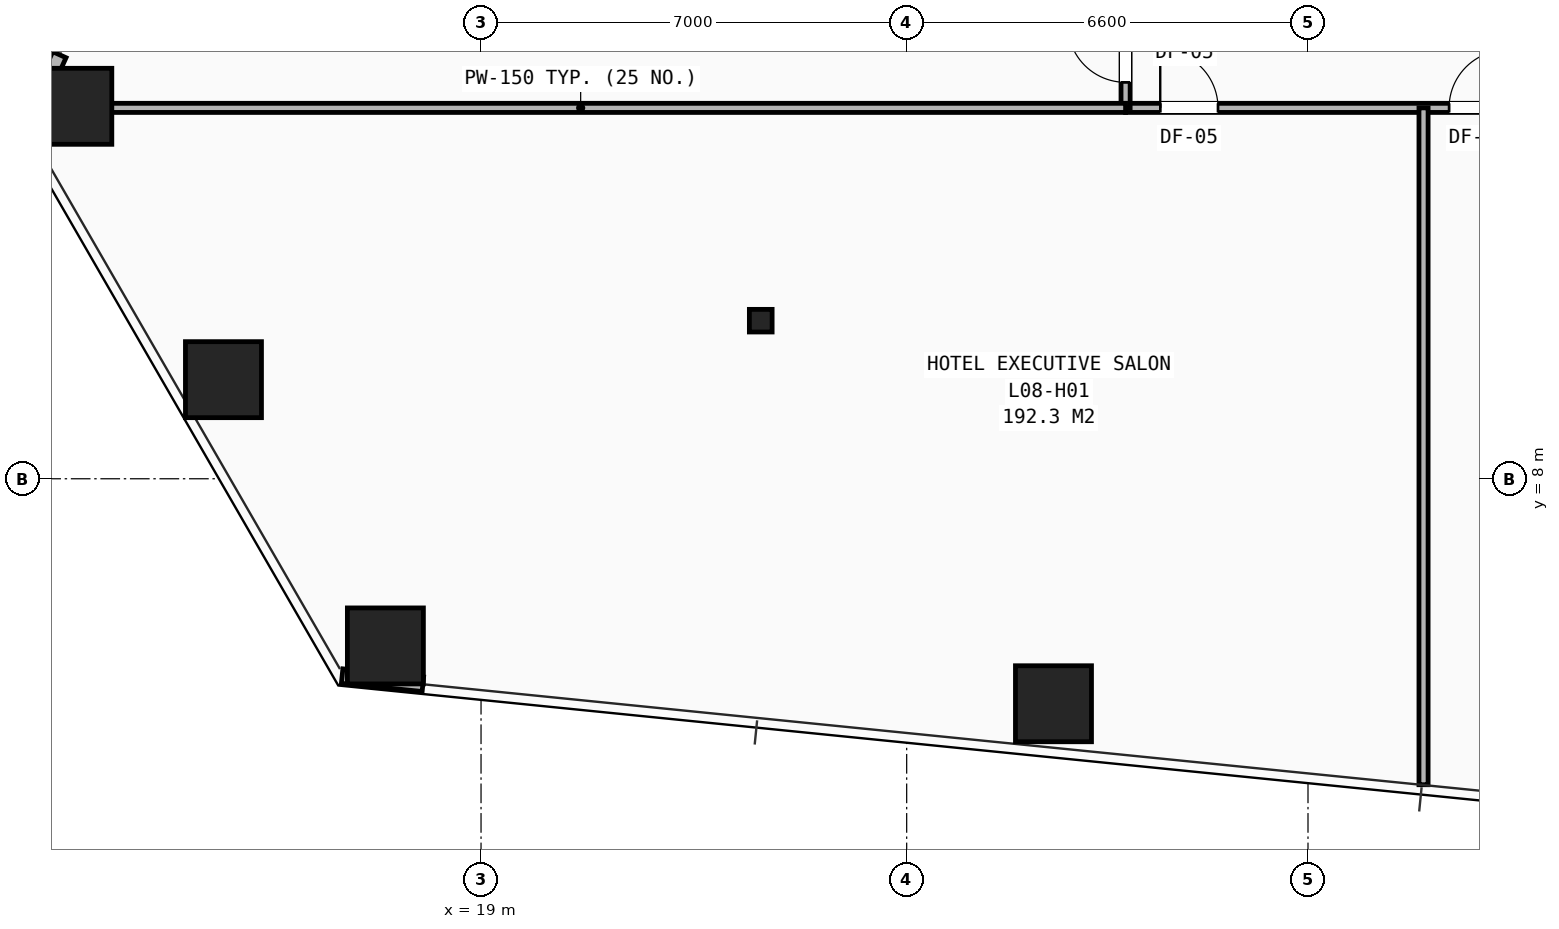
"""IFC4 building model, lengths in metres.
Left out: names, types, materials, properties, quantities, classifications, styles, units other than length and angle.
Written with IfcOpenShell. Run it as: python <this file> out.ifc"""

import sys

from ifc_helpers import new_model, si_unit, direction, frame, frame_2d, origin, origin_2d, place, context, subcontext, project, spatial, rectangle, hollow_rectangle, i_section, extrude, element, fill, save


model = new_model("IFC4")
c1 = context("Model", 3, precision=1e-05, world=origin(), true_north=direction((0.0, 1.0)))
c2 = subcontext(c1, "Body", "Model", "MODEL_VIEW")
j1 = project(units=[si_unit("LENGTHUNIT", "METRE"), si_unit("PLANEANGLEUNIT", "RADIAN")], contexts=[c1])
p1 = place(None, origin())
s1 = spatial("IfcSite", under=j1, at=p1, CompositionType="ELEMENT")
p2 = place(p1, origin())
s2 = spatial("IfcBuilding", under=s1, at=p2, CompositionType="ELEMENT")
p3 = place(p2, frame((0.0, 0.0, 33.6)))
s3 = spatial("IfcBuildingStorey", under=s2, at=p3, CompositionType="ELEMENT", Elevation=33.6)
p4 = place(p3, frame((23.6, 10.6, 0.0), z_axis=(0.0, 0.0, 1.0), x_axis=(1.0, 0.0, 0.0)))
e1 = element("IfcColumn", 1, at=p4, inside=s3, PredefinedType="COLUMN", context=c2, shape_type="SweptSolid", body=[
    extrude(i_section(OverallWidth=0.374, OverallDepth=0.372, WebThickness=0.016, FlangeThickness=0.026, at=origin_2d()), origin(), (0.0, 0.0, 1.0), 3.2),
])
for number, where, z_axis, x_axis in (
    (2, (12.303, 14.126, 0.0), (0.0, 0.0, 1.0), (1.0, 0.0, 0.0)),
    (3, (14.764, 9.63, 0.0), (0.0, 0.0, 1.0), (1.0, 0.0, 0.0)),
    (4, (17.427, 5.251, 0.0), (0.0, 0.0, 1.0), (1.0, 0.0, 0.0)),
    (5, (28.414, 4.3, 0.0), (0.0, 0.0, 1.0), (1.0, 0.0, 0.0)),
):
    element("IfcColumn", number, at=place(p3, frame(where, z_axis=z_axis, x_axis=x_axis)), inside=s3, PredefinedType="COLUMN", context=c2, shape_type="SweptSolid", body=[
        extrude(hollow_rectangle(XDim=1.25, YDim=1.25, WallThickness=0.08, at=origin_2d()), origin(), (0.0, 0.0, 1.0), 3.2),
    ])
p5 = place(p3, frame((12.065, 14.975, 0.0), z_axis=(0.0, 0.0, 1.0), x_axis=(-0.410767856127, -0.91173996752, 0.0)))
e6 = element("IfcWall", 6, at=p5, inside=s3, PredefinedType="SHEAR", context=c2, shape_type="SweptSolid", body=[
    extrude(rectangle(XDim=1.334, YDim=0.24, at=frame_2d((0.667, 0.0))), origin(), (0.0, 0.0, 1.0), 2.263),
])
p6 = place(p3, frame((16.716, 4.754, 0.0), z_axis=(0.0, 0.0, 1.0), x_axis=(0.994962653924, -0.100246283205, 0.0)))
e7 = element("IfcWall", 7, at=p6, inside=s3, PredefinedType="SHEAR", context=c2, shape_type="SweptSolid", body=[
    extrude(rectangle(XDim=1.335, YDim=0.24, at=frame_2d((0.667, 0.0))), origin(), (0.0, 0.0, 1.0), 2.263),
])
p7 = place(p3, frame((29.6, 14.1, 0.0), z_axis=(0.0, 0.0, 1.0), x_axis=(1.0, 0.0, 0.0)))
e8 = element("IfcWall", 8, at=p7, inside=s3, PredefinedType="PARTITIONING", context=c2, shape_type="SweptSolid", body=[
    extrude(rectangle(XDim=20.8, YDim=0.15, at=frame_2d((10.4, 0.0))), origin(), (0.0, 0.0, 1.0), 2.191),
])
p8 = place(p7, frame((0.57, 0.0, 0.0)))
e9 = element("IfcOpeningElement", 9, at=p8, cuts=e8, PredefinedType="OPENING", context=c2, shape_type="SweptSolid", body=[
    extrude(rectangle(XDim=0.95, YDim=2.1, at=frame_2d((0.475, 1.05))), frame((0.0, 0.085, 0.0), z_axis=(0.0, -1.0, 0.0), x_axis=(1.0, 0.0, 0.0)), (0.0, 0.0, 1.0), 0.17),
])
p9 = place(p7, frame((5.32, 0.0, 0.0)))
e10 = element("IfcOpeningElement", 10, at=p9, cuts=e8, PredefinedType="OPENING", context=c2, shape_type="SweptSolid", body=[
    extrude(rectangle(XDim=0.95, YDim=2.1, at=frame_2d((0.475, 1.05))), frame((0.0, 0.085, 0.0), z_axis=(0.0, -1.0, 0.0), x_axis=(1.0, 0.0, 0.0)), (0.0, 0.0, 1.0), 0.17),
])
p10 = place(p7, frame((13.32, 0.0, 0.0)))
e11 = element("IfcOpeningElement", 11, at=p10, cuts=e8, PredefinedType="OPENING", context=c2, shape_type="SweptSolid", body=[
    extrude(rectangle(XDim=0.95, YDim=2.1, at=frame_2d((0.475, 1.05))), frame((0.0, 0.085, 0.0), z_axis=(0.0, -1.0, 0.0), x_axis=(1.0, 0.0, 0.0)), (0.0, 0.0, 1.0), 0.17),
])
p11 = place(p3, frame((29.6, 14.1, 0.0), z_axis=(0.0, 0.0, 1.0), x_axis=(0.0, 1.0, 0.0)))
e12 = element("IfcWall", 12, at=p11, inside=s3, PredefinedType="PARTITIONING", context=c2, shape_type="SweptSolid", body=[
    extrude(rectangle(XDim=21.9, YDim=0.15, at=frame_2d((10.95, 0.0))), origin(), (0.0, 0.0, 1.0), 2.191),
])
p12 = place(p11, frame((0.42, 0.0, 0.0)))
e13 = element("IfcOpeningElement", 13, at=p12, cuts=e12, PredefinedType="OPENING", context=c2, shape_type="SweptSolid", body=[
    extrude(rectangle(XDim=0.95, YDim=2.1, at=frame_2d((0.475, 1.05))), frame((0.0, 0.085, 0.0), z_axis=(0.0, -1.0, 0.0), x_axis=(1.0, 0.0, 0.0)), (0.0, 0.0, 1.0), 0.17),
])
p13 = place(p11, frame((6.82, 0.0, 0.0)))
e14 = element("IfcOpeningElement", 14, at=p13, cuts=e12, PredefinedType="OPENING", context=c2, shape_type="SweptSolid", body=[
    extrude(rectangle(XDim=0.95, YDim=2.1, at=frame_2d((0.475, 1.05))), frame((0.0, 0.085, 0.0), z_axis=(0.0, -1.0, 0.0), x_axis=(1.0, 0.0, 0.0)), (0.0, 0.0, 1.0), 0.17),
])
p14 = place(p11, frame((14.32, 0.0, 0.0)))
e15 = element("IfcOpeningElement", 15, at=p14, cuts=e12, PredefinedType="OPENING", context=c2, shape_type="SweptSolid", body=[
    extrude(rectangle(XDim=0.95, YDim=2.1, at=frame_2d((0.475, 1.05))), frame((0.0, 0.085, 0.0), z_axis=(0.0, -1.0, 0.0), x_axis=(1.0, 0.0, 0.0)), (0.0, 0.0, 1.0), 0.17),
])
p15 = place(p3, frame((34.5, 2.968, 0.0), z_axis=(0.0, 0.0, 1.0), x_axis=(0.0, 1.0, 0.0)))
e16 = element("IfcWall", 16, at=p15, inside=s3, PredefinedType="PARTITIONING", context=c2, shape_type="SweptSolid", body=[
    extrude(rectangle(XDim=11.132, YDim=0.15, at=frame_2d((5.566, 0.0))), origin(), (0.0, 0.0, 1.0), 2.191),
])
p16 = place(p3, frame((11.677, 14.1, 0.0), z_axis=(0.0, 0.0, 1.0), x_axis=(1.0, 0.0, 0.0)))
e17 = element("IfcWall", 17, at=p16, inside=s3, PredefinedType="PARTITIONING", context=c2, shape_type="SweptSolid", body=[
    extrude(rectangle(XDim=17.923, YDim=0.15, at=frame_2d((8.961, 0.0))), origin(), (0.0, 0.0, 1.0), 2.191),
])
p17 = place(p8, origin())
e18 = element("IfcDoor", 18, at=p17, inside=s3, OperationType="SINGLE_SWING_LEFT", PredefinedType="DOOR", context=c2, shape_type="SweptSolid", body=[
    extrude(rectangle(XDim=0.95, YDim=2.1, at=frame_2d((0.475, 1.05))), frame((0.0, 0.025, 0.0), z_axis=(0.0, -1.0, 0.0), x_axis=(1.0, 0.0, 0.0)), (0.0, 0.0, 1.0), 0.05),
])
fill(e9, e18)
p18 = place(p9, origin())
e19 = element("IfcDoor", 19, at=p18, inside=s3, OperationType="SINGLE_SWING_RIGHT", PredefinedType="DOOR", context=c2, shape_type="SweptSolid", body=[
    extrude(rectangle(XDim=0.95, YDim=2.1, at=frame_2d((0.475, 1.05))), frame((0.0, 0.025, 0.0), z_axis=(0.0, -1.0, 0.0), x_axis=(1.0, 0.0, 0.0)), (0.0, 0.0, 1.0), 0.05),
])
fill(e10, e19)
p19 = place(p12, origin())
e20 = element("IfcDoor", 20, at=p19, inside=s3, OperationType="SINGLE_SWING_RIGHT", PredefinedType="DOOR", context=c2, shape_type="SweptSolid", body=[
    extrude(rectangle(XDim=0.95, YDim=2.1, at=frame_2d((0.475, 1.05))), frame((0.0, 0.025, 0.0), z_axis=(0.0, -1.0, 0.0), x_axis=(1.0, 0.0, 0.0)), (0.0, 0.0, 1.0), 0.05),
])
fill(e13, e20)
save(model, sys.argv[1])
